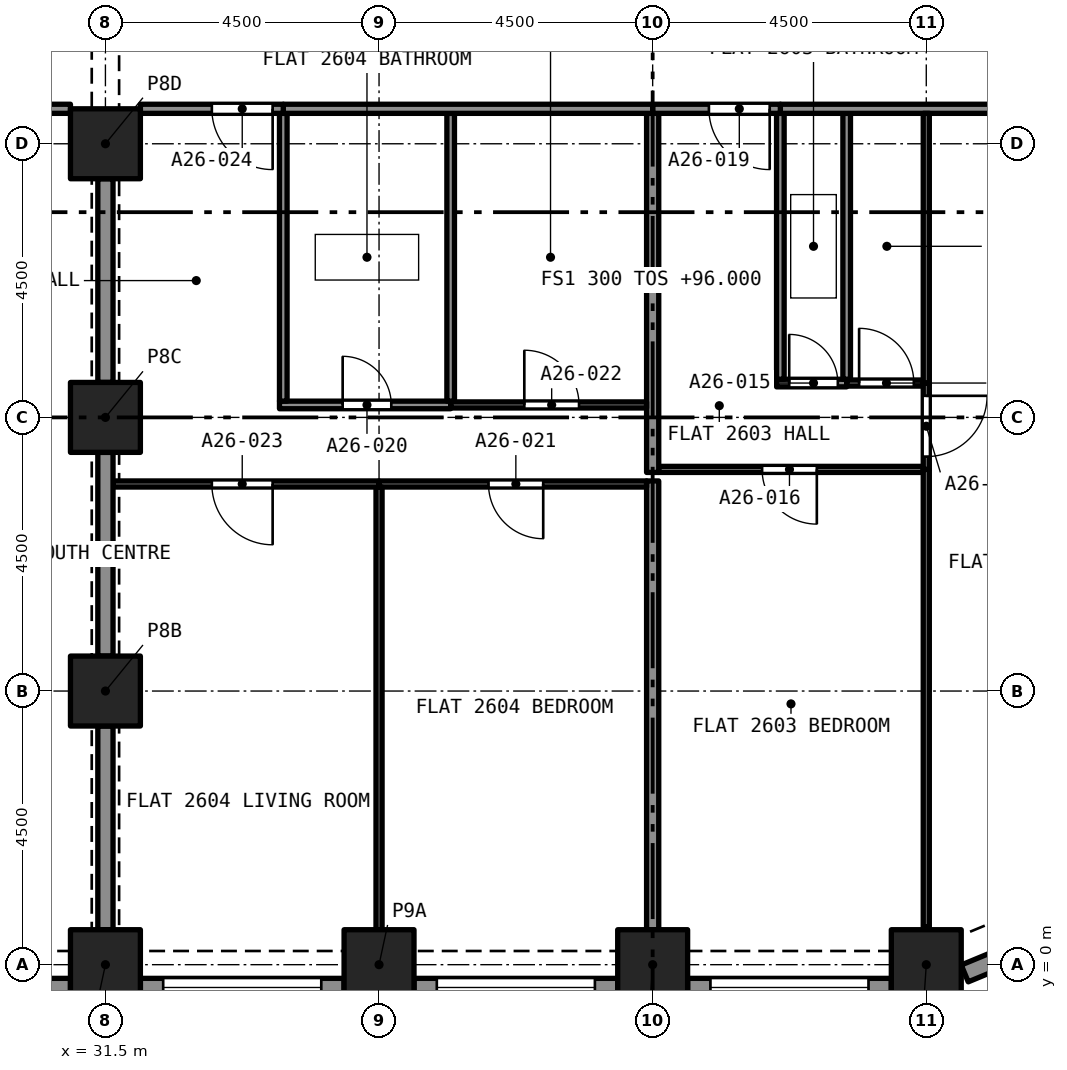
"""IFC4 building model, lengths in metres.
Left out: names, types, materials, properties, quantities, classifications, styles, units other than length and angle.
Written with IfcOpenShell. Run it as: python <this file> out.ifc"""

import sys

from ifc_helpers import new_model, si_unit, direction, frame, frame_2d, origin, origin_2d, place, context, subcontext, project, spatial, rectangle, extrude, element, fill, save


model = new_model("IFC4")
c1 = context("Model", 3, precision=1e-05, world=origin(), true_north=direction((0.0, 1.0)))
c2 = subcontext(c1, "Body", "Model", "MODEL_VIEW")
j1 = project(units=[si_unit("LENGTHUNIT", "METRE"), si_unit("PLANEANGLEUNIT", "RADIAN")], contexts=[c1])
p1 = place(None, origin())
s1 = spatial("IfcSite", under=j1, at=p1, CompositionType="ELEMENT")
p2 = place(p1, origin())
s2 = spatial("IfcBuilding", under=s1, at=p2, CompositionType="ELEMENT")
p3 = place(p2, frame((0.0, 0.0, 96.0)))
s3 = spatial("IfcBuildingStorey", under=s2, at=p3, CompositionType="ELEMENT", Elevation=96.0)
for number, where, z_axis, x_axis in (
    (1, (31.5, 0.0, 0.0), (0.0, 0.0, 1.0), (1.0, 0.0, 0.0)),
    (2, (36.0, 0.0, 0.0), (0.0, 0.0, 1.0), (1.0, 0.0, 0.0)),
    (3, (40.5, 0.0, 0.0), (0.0, 0.0, 1.0), (1.0, 0.0, 0.0)),
    (4, (45.0, 0.0, 0.0), (0.0, 0.0, 1.0), (1.0, 0.0, 0.0)),
    (5, (31.5, 4.5, 0.0), (0.0, 0.0, 1.0), (1.0, 0.0, 0.0)),
    (6, (31.5, 9.0, 0.0), (0.0, 0.0, 1.0), (1.0, 0.0, 0.0)),
    (7, (31.5, 13.5, 0.0), (0.0, 0.0, 1.0), (1.0, 0.0, 0.0)),
):
    element("IfcColumn", number, at=place(p3, frame(where, z_axis=z_axis, x_axis=x_axis)), inside=s3, PredefinedType="COLUMN", context=c2, shape_type="SweptSolid", body=[
        extrude(rectangle(XDim=1.15, YDim=1.15, at=origin_2d()), origin(), (0.0, 0.0, 1.0), 3.2),
    ])
p4 = place(p3, frame((30.925, -0.375, 0.0), z_axis=(0.0, 0.0, 1.0), x_axis=(-1.0, 0.0, 0.0)))
e8 = element("IfcWall", 8, at=p4, inside=s3, PredefinedType="SOLIDWALL", context=c2, shape_type="SweptSolid", body=[
    extrude(rectangle(XDim=3.35, YDim=0.3, at=frame_2d((1.675, 0.0))), origin(), (0.0, 0.0, 1.0), 3.2),
])
p5 = place(p4, frame((0.375, 0.0, 0.45)))
e9 = element("IfcOpeningElement", 9, at=p5, cuts=e8, PredefinedType="OPENING", context=c2, shape_type="SweptSolid", body=[
    extrude(rectangle(XDim=2.6, YDim=1.95, at=frame_2d((1.3, 0.975))), frame((0.0, 0.16, 0.0), z_axis=(0.0, -1.0, 0.0), x_axis=(1.0, 0.0, 0.0)), (0.0, 0.0, 1.0), 0.32),
])
p6 = place(p3, frame((35.425, -0.375, 0.0), z_axis=(0.0, 0.0, 1.0), x_axis=(-1.0, 0.0, 0.0)))
e10 = element("IfcWall", 10, at=p6, inside=s3, PredefinedType="SOLIDWALL", context=c2, shape_type="SweptSolid", body=[
    extrude(rectangle(XDim=3.35, YDim=0.3, at=frame_2d((1.675, 0.0))), origin(), (0.0, 0.0, 1.0), 3.2),
])
p7 = place(p6, frame((0.375, 0.0, 0.45)))
e11 = element("IfcOpeningElement", 11, at=p7, cuts=e10, PredefinedType="OPENING", context=c2, shape_type="SweptSolid", body=[
    extrude(rectangle(XDim=2.6, YDim=1.95, at=frame_2d((1.3, 0.975))), frame((0.0, 0.16, 0.0), z_axis=(0.0, -1.0, 0.0), x_axis=(1.0, 0.0, 0.0)), (0.0, 0.0, 1.0), 0.32),
])
p8 = place(p3, frame((39.925, -0.375, 0.0), z_axis=(0.0, 0.0, 1.0), x_axis=(-1.0, 0.0, 0.0)))
e12 = element("IfcWall", 12, at=p8, inside=s3, PredefinedType="SOLIDWALL", context=c2, shape_type="SweptSolid", body=[
    extrude(rectangle(XDim=3.35, YDim=0.3, at=frame_2d((1.675, 0.0))), origin(), (0.0, 0.0, 1.0), 3.2),
])
p9 = place(p8, frame((0.375, 0.0, 0.45)))
e13 = element("IfcOpeningElement", 13, at=p9, cuts=e12, PredefinedType="OPENING", context=c2, shape_type="SweptSolid", body=[
    extrude(rectangle(XDim=2.6, YDim=1.95, at=frame_2d((1.3, 0.975))), frame((0.0, 0.16, 0.0), z_axis=(0.0, -1.0, 0.0), x_axis=(1.0, 0.0, 0.0)), (0.0, 0.0, 1.0), 0.32),
])
p10 = place(p3, frame((44.425, -0.375, 0.0), z_axis=(0.0, 0.0, 1.0), x_axis=(-1.0, 0.0, 0.0)))
e14 = element("IfcWall", 14, at=p10, inside=s3, PredefinedType="SOLIDWALL", context=c2, shape_type="SweptSolid", body=[
    extrude(rectangle(XDim=3.35, YDim=0.3, at=frame_2d((1.675, 0.0))), origin(), (0.0, 0.0, 1.0), 3.2),
])
p11 = place(p10, frame((0.375, 0.0, 0.45)))
e15 = element("IfcOpeningElement", 15, at=p11, cuts=e14, PredefinedType="OPENING", context=c2, shape_type="SweptSolid", body=[
    extrude(rectangle(XDim=2.6, YDim=1.95, at=frame_2d((1.3, 0.975))), frame((0.0, 0.16, 0.0), z_axis=(0.0, -1.0, 0.0), x_axis=(1.0, 0.0, 0.0)), (0.0, 0.0, 1.0), 0.32),
])
p12 = place(p3, frame((47.631, 0.684, 0.0), z_axis=(0.0, 0.0, 1.0), x_axis=(-0.923862802911, -0.382723818695, 0.0)))
e16 = element("IfcWall", 16, at=p12, inside=s3, PredefinedType="SOLIDWALL", context=c2, shape_type="SweptSolid", body=[
    extrude(rectangle(XDim=2.164, YDim=0.3, at=frame_2d((1.082, 0.0))), origin(), (0.0, 0.0, 1.0), 3.2),
])
p13 = place(p12, frame((0.271, 0.0, 0.45)))
e17 = element("IfcOpeningElement", 17, at=p13, cuts=e16, PredefinedType="OPENING", context=c2, shape_type="SweptSolid", body=[
    extrude(rectangle(XDim=1.4, YDim=1.95, at=frame_2d((0.7, 0.975))), frame((0.0, 0.16, 0.0), z_axis=(0.0, -1.0, 0.0), x_axis=(1.0, 0.0, 0.0)), (0.0, 0.0, 1.0), 0.32),
])
p14 = place(p3, frame((42.538, 9.565, 0.0), z_axis=(0.0, 0.0, 1.0), x_axis=(1.0, 0.0, 0.0)))
e18 = element("IfcWall", 18, at=p14, inside=s3, PredefinedType="PARTITIONING", context=c2, shape_type="SweptSolid", body=[
    extrude(rectangle(XDim=1.153, YDim=0.125, at=frame_2d((0.577, 0.0))), origin(), (0.0, 0.0, 1.0), 2.9),
])
p15 = place(p14, frame((0.208, 0.0, 0.0)))
e19 = element("IfcOpeningElement", 19, at=p15, cuts=e18, PredefinedType="OPENING", context=c2, shape_type="SweptSolid", body=[
    extrude(rectangle(XDim=0.8, YDim=2.1, at=frame_2d((0.4, 1.05))), frame((0.0, 0.073, 0.0), z_axis=(0.0, -1.0, 0.0), x_axis=(1.0, 0.0, 0.0)), (0.0, 0.0, 1.0), 0.145),
])
for number, where, z_axis, x_axis in (
    (20, (42.6, 9.627, 0.0), (0.0, 0.0, 1.0), (0.0, 1.0, 0.0)),
    (21, (43.691, 9.627, 0.0), (0.0, 0.0, 1.0), (0.0, 1.0, 0.0)),
):
    element("IfcWall", number, at=place(p3, frame(where, z_axis=z_axis, x_axis=x_axis)), inside=s3, PredefinedType="PARTITIONING", context=c2, shape_type="SweptSolid", body=[
        extrude(rectangle(XDim=4.373, YDim=0.125, at=frame_2d((2.186, 0.0))), origin(), (0.0, 0.0, 1.0), 2.9),
    ])
p16 = place(p3, frame((42.6, 14.075, 0.0), z_axis=(0.0, 0.0, 1.0), x_axis=(1.0, 0.0, 0.0)))
e22 = element("IfcWall", 22, at=p16, inside=s3, PredefinedType="PARTITIONING", context=c2, shape_type="SweptSolid", body=[
    extrude(rectangle(XDim=6.325, YDim=0.15, at=frame_2d((3.163, 0.0))), origin(), (0.0, 0.0, 1.0), 2.9),
])
p17 = place(p3, frame((44.95, 8.145, 0.0), z_axis=(0.0, 0.0, 1.0), x_axis=(-1.0, 0.0, 0.0)))
e23 = element("IfcWall", 23, at=p17, inside=s3, PredefinedType="PARTITIONING", context=c2, shape_type="SweptSolid", body=[
    extrude(rectangle(XDim=4.35, YDim=0.1, at=frame_2d((2.175, 0.0))), origin(), (0.0, 0.0, 1.0), 2.9),
])
p18 = place(p17, frame((1.75, 0.0, 0.0)))
e24 = element("IfcOpeningElement", 24, at=p18, cuts=e23, PredefinedType="OPENING", context=c2, shape_type="SweptSolid", body=[
    extrude(rectangle(XDim=0.9, YDim=2.1, at=frame_2d((0.45, 1.05))), frame((0.0, 0.06, 0.0), z_axis=(0.0, -1.0, 0.0), x_axis=(1.0, 0.0, 0.0)), (0.0, 0.0, 1.0), 0.12),
])
p19 = place(p3, frame((45.0, 0.622, 0.0), z_axis=(0.0, 0.0, 1.0), x_axis=(0.0, 1.0, 0.0)))
e25 = element("IfcWall", 25, at=p19, inside=s3, PredefinedType="PARTITIONING", context=c2, shape_type="SweptSolid", body=[
    extrude(rectangle(XDim=7.523, YDim=0.1, at=frame_2d((3.761, 0.0))), origin(), (0.0, 0.0, 1.0), 2.9),
])
p20 = place(p3, frame((40.5, 0.575, 0.0), z_axis=(0.0, 0.0, 1.0), x_axis=(0.0, 1.0, 0.0)))
e26 = element("IfcWall", 26, at=p20, inside=s3, PredefinedType="PARTITIONING", context=c2, shape_type="SweptSolid", body=[
    extrude(rectangle(XDim=7.38, YDim=0.2, at=frame_2d((3.69, 0.0))), origin(), (0.0, 0.0, 1.0), 2.9),
])
p21 = place(p3, frame((43.691, 9.565, 0.0), z_axis=(0.0, 0.0, 1.0), x_axis=(1.0, 0.0, 0.0)))
e27 = element("IfcWall", 27, at=p21, inside=s3, PredefinedType="PARTITIONING", context=c2, shape_type="SweptSolid", body=[
    extrude(rectangle(XDim=1.259, YDim=0.1, at=frame_2d((0.629, 0.0))), origin(), (0.0, 0.0, 1.0), 2.9),
])
p22 = place(p21, frame((0.205, 0.0, 0.0)))
e28 = element("IfcOpeningElement", 28, at=p22, cuts=e27, PredefinedType="OPENING", context=c2, shape_type="SweptSolid", body=[
    extrude(rectangle(XDim=0.9, YDim=2.1, at=frame_2d((0.45, 1.05))), frame((0.0, 0.06, 0.0), z_axis=(0.0, -1.0, 0.0), x_axis=(1.0, 0.0, 0.0)), (0.0, 0.0, 1.0), 0.12),
])
p23 = place(p3, frame((45.0, 9.565, 0.0), z_axis=(0.0, 0.0, 1.0), x_axis=(0.0, -1.0, 0.0)))
e29 = element("IfcWall", 29, at=p23, inside=s3, PredefinedType="PARTITIONING", context=c2, shape_type="SweptSolid", body=[
    extrude(rectangle(XDim=1.42, YDim=0.1, at=frame_2d((0.71, 0.0))), origin(), (0.0, 0.0, 1.0), 2.9),
])
p24 = place(p23, frame((0.21, 0.0, 0.0)))
e30 = element("IfcOpeningElement", 30, at=p24, cuts=e29, PredefinedType="OPENING", context=c2, shape_type="SweptSolid", body=[
    extrude(rectangle(XDim=1.0, YDim=2.1, at=frame_2d((0.5, 1.05))), frame((0.0, 0.06, 0.0), z_axis=(0.0, -1.0, 0.0), x_axis=(1.0, 0.0, 0.0)), (0.0, 0.0, 1.0), 0.12),
])
p25 = place(p3, frame((40.5, 8.095, 0.0), z_axis=(0.0, 0.0, 1.0), x_axis=(0.0, 1.0, 0.0)))
e31 = element("IfcWall", 31, at=p25, inside=s3, PredefinedType="PARTITIONING", context=c2, shape_type="SweptSolid", body=[
    extrude(rectangle(XDim=5.905, YDim=0.2, at=frame_2d((2.953, 0.0))), origin(), (0.0, 0.0, 1.0), 2.9),
])
p26 = place(p3, frame((42.6, 14.075, 0.0), z_axis=(0.0, 0.0, 1.0), x_axis=(-1.0, 0.0, 0.0)))
e32 = element("IfcWall", 32, at=p26, inside=s3, PredefinedType="PARTITIONING", context=c2, shape_type="SweptSolid", body=[
    extrude(rectangle(XDim=2.1, YDim=0.15, at=frame_2d((1.05, 0.0))), origin(), (0.0, 0.0, 1.0), 2.9),
])
p27 = place(p26, frame((0.175, 0.0, 0.0)))
e33 = element("IfcOpeningElement", 33, at=p27, cuts=e32, PredefinedType="OPENING", context=c2, shape_type="SweptSolid", body=[
    extrude(rectangle(XDim=1.0, YDim=2.1, at=frame_2d((0.5, 1.05))), frame((0.0, 0.085, 0.0), z_axis=(0.0, -1.0, 0.0), x_axis=(1.0, 0.0, 0.0)), (0.0, 0.0, 1.0), 0.17),
])
p28 = place(p3, frame((45.0, 9.565, 0.0), z_axis=(0.0, 0.0, 1.0), x_axis=(0.0, 1.0, 0.0)))
e34 = element("IfcWall", 34, at=p28, inside=s3, PredefinedType="PARTITIONING", context=c2, shape_type="SweptSolid", body=[
    extrude(rectangle(XDim=4.435, YDim=0.1, at=frame_2d((2.218, 0.0))), origin(), (0.0, 0.0, 1.0), 2.9),
])
p29 = place(p3, frame((34.363, 9.205, 0.0), z_axis=(0.0, 0.0, 1.0), x_axis=(1.0, 0.0, 0.0)))
e35 = element("IfcWall", 35, at=p29, inside=s3, PredefinedType="PARTITIONING", context=c2, shape_type="SweptSolid", body=[
    extrude(rectangle(XDim=2.816, YDim=0.125, at=frame_2d((1.408, 0.0))), origin(), (0.0, 0.0, 1.0), 2.9),
])
p30 = place(p29, frame((1.039, 0.0, 0.0)))
e36 = element("IfcOpeningElement", 36, at=p30, cuts=e35, PredefinedType="OPENING", context=c2, shape_type="SweptSolid", body=[
    extrude(rectangle(XDim=0.8, YDim=2.1, at=frame_2d((0.4, 1.05))), frame((0.0, 0.073, 0.0), z_axis=(0.0, -1.0, 0.0), x_axis=(1.0, 0.0, 0.0)), (0.0, 0.0, 1.0), 0.145),
])
for number, where, z_axis, x_axis in (
    (37, (34.425, 9.268, 0.0), (0.0, 0.0, 1.0), (0.0, 1.0, 0.0)),
    (38, (37.178, 9.268, 0.0), (0.0, 0.0, 1.0), (0.0, 1.0, 0.0)),
):
    element("IfcWall", number, at=place(p3, frame(where, z_axis=z_axis, x_axis=x_axis)), inside=s3, PredefinedType="PARTITIONING", context=c2, shape_type="SweptSolid", body=[
        extrude(rectangle(XDim=4.732, YDim=0.125, at=frame_2d((2.366, 0.0))), origin(), (0.0, 0.0, 1.0), 2.9),
    ])
p31 = place(p3, frame((34.425, 14.075, 0.0), z_axis=(0.0, 0.0, 1.0), x_axis=(1.0, 0.0, 0.0)))
e39 = element("IfcWall", 39, at=p31, inside=s3, PredefinedType="PARTITIONING", context=c2, shape_type="SweptSolid", body=[
    extrude(rectangle(XDim=6.075, YDim=0.15, at=frame_2d((3.038, 0.0))), origin(), (0.0, 0.0, 1.0), 2.9),
])
p32 = place(p3, frame((40.4, 7.905, 0.0), z_axis=(0.0, 0.0, 1.0), x_axis=(-1.0, 0.0, 0.0)))
e40 = element("IfcWall", 40, at=p32, inside=s3, PredefinedType="PARTITIONING", context=c2, shape_type="SweptSolid", body=[
    extrude(rectangle(XDim=4.4, YDim=0.1, at=frame_2d((2.2, 0.0))), origin(), (0.0, 0.0, 1.0), 2.9),
])
p33 = place(p32, frame((1.7, 0.0, 0.0)))
e41 = element("IfcOpeningElement", 41, at=p33, cuts=e40, PredefinedType="OPENING", context=c2, shape_type="SweptSolid", body=[
    extrude(rectangle(XDim=0.9, YDim=2.1, at=frame_2d((0.45, 1.05))), frame((0.0, 0.06, 0.0), z_axis=(0.0, -1.0, 0.0), x_axis=(1.0, 0.0, 0.0)), (0.0, 0.0, 1.0), 0.12),
])
p34 = place(p3, frame((36.0, 0.575, 0.0), z_axis=(0.0, 0.0, 1.0), x_axis=(0.0, 1.0, 0.0)))
e42 = element("IfcWall", 42, at=p34, inside=s3, PredefinedType="PARTITIONING", context=c2, shape_type="SweptSolid", body=[
    extrude(rectangle(XDim=7.28, YDim=0.1, at=frame_2d((3.64, 0.0))), origin(), (0.0, 0.0, 1.0), 2.9),
])
p35 = place(p3, frame((37.178, 9.205, 0.0), z_axis=(0.0, 0.0, 1.0), x_axis=(1.0, 0.0, 0.0)))
e43 = element("IfcWall", 43, at=p35, inside=s3, PredefinedType="PARTITIONING", context=c2, shape_type="SweptSolid", body=[
    extrude(rectangle(XDim=3.222, YDim=0.1, at=frame_2d((1.611, 0.0))), origin(), (0.0, 0.0, 1.0), 2.9),
])
p36 = place(p35, frame((1.211, 0.0, 0.0)))
e44 = element("IfcOpeningElement", 44, at=p36, cuts=e43, PredefinedType="OPENING", context=c2, shape_type="SweptSolid", body=[
    extrude(rectangle(XDim=0.9, YDim=2.1, at=frame_2d((0.45, 1.05))), frame((0.0, 0.06, 0.0), z_axis=(0.0, -1.0, 0.0), x_axis=(1.0, 0.0, 0.0)), (0.0, 0.0, 1.0), 0.12),
])
p37 = place(p3, frame((36.0, 7.905, 0.0), z_axis=(0.0, 0.0, 1.0), x_axis=(-1.0, 0.0, 0.0)))
e45 = element("IfcWall", 45, at=p37, inside=s3, PredefinedType="PARTITIONING", context=c2, shape_type="SweptSolid", body=[
    extrude(rectangle(XDim=4.375, YDim=0.1, at=frame_2d((2.188, 0.0))), origin(), (0.0, 0.0, 1.0), 2.9),
])
p38 = place(p37, frame((1.75, 0.0, 0.0)))
e46 = element("IfcOpeningElement", 46, at=p38, cuts=e45, PredefinedType="OPENING", context=c2, shape_type="SweptSolid", body=[
    extrude(rectangle(XDim=1.0, YDim=2.1, at=frame_2d((0.5, 1.05))), frame((0.0, 0.06, 0.0), z_axis=(0.0, -1.0, 0.0), x_axis=(1.0, 0.0, 0.0)), (0.0, 0.0, 1.0), 0.12),
])
p39 = place(p3, frame((31.5, 9.575, 0.0), z_axis=(0.0, 0.0, 1.0), x_axis=(0.0, 1.0, 0.0)))
e47 = element("IfcWall", 47, at=p39, inside=s3, PredefinedType="PARTITIONING", context=c2, shape_type="SweptSolid", body=[
    extrude(rectangle(XDim=3.35, YDim=0.25, at=frame_2d((1.675, 0.0))), origin(), (0.0, 0.0, 1.0), 2.38),
])
p40 = place(p3, frame((34.425, 14.075, 0.0), z_axis=(0.0, 0.0, 1.0), x_axis=(-1.0, 0.0, 0.0)))
e48 = element("IfcWall", 48, at=p40, inside=s3, PredefinedType="PARTITIONING", context=c2, shape_type="SweptSolid", body=[
    extrude(rectangle(XDim=2.35, YDim=0.15, at=frame_2d((1.175, 0.0))), origin(), (0.0, 0.0, 1.0), 2.9),
])
p41 = place(p40, frame((0.175, 0.0, 0.0)))
e49 = element("IfcOpeningElement", 49, at=p41, cuts=e48, PredefinedType="OPENING", context=c2, shape_type="SweptSolid", body=[
    extrude(rectangle(XDim=1.0, YDim=2.1, at=frame_2d((0.5, 1.05))), frame((0.0, 0.085, 0.0), z_axis=(0.0, -1.0, 0.0), x_axis=(1.0, 0.0, 0.0)), (0.0, 0.0, 1.0), 0.17),
])
for number, where, z_axis, x_axis in (
    (50, (31.5, 0.575, 0.0), (0.0, 0.0, 1.0), (0.0, 1.0, 0.0)),
    (51, (31.5, 5.075, 0.0), (0.0, 0.0, 1.0), (0.0, 1.0, 0.0)),
):
    element("IfcWall", number, at=place(p3, frame(where, z_axis=z_axis, x_axis=x_axis)), inside=s3, PredefinedType="PARTITIONING", context=c2, shape_type="SweptSolid", body=[
        extrude(rectangle(XDim=3.35, YDim=0.25, at=frame_2d((1.675, 0.0))), origin(), (0.0, 0.0, 1.0), 2.38),
    ])
p42 = place(p3, frame((30.925, 14.075, 0.0), z_axis=(0.0, 0.0, 1.0), x_axis=(-1.0, 0.0, 0.0)))
e52 = element("IfcWall", 52, at=p42, inside=s3, PredefinedType="PARTITIONING", context=c2, shape_type="SweptSolid", body=[
    extrude(rectangle(XDim=3.925, YDim=0.15, at=frame_2d((1.962, 0.0))), origin(), (0.0, 0.0, 1.0), 2.75),
])
p43 = place(p42, frame((1.175, 0.0, 0.0)))
e53 = element("IfcOpeningElement", 53, at=p43, cuts=e52, PredefinedType="OPENING", context=c2, shape_type="SweptSolid", body=[
    extrude(rectangle(XDim=1.0, YDim=2.1, at=frame_2d((0.5, 1.05))), frame((0.0, 0.085, 0.0), z_axis=(0.0, -1.0, 0.0), x_axis=(1.0, 0.0, 0.0)), (0.0, 0.0, 1.0), 0.17),
])
p44 = place(p7, origin())
e54 = element("IfcWindow", 54, at=p44, inside=s3, PartitioningType="SINGLE_PANEL", PredefinedType="WINDOW", context=c2, shape_type="SweptSolid", body=[
    extrude(rectangle(XDim=2.6, YDim=1.95, at=frame_2d((1.3, 0.975))), frame((0.0, 0.03, 0.0), z_axis=(0.0, -1.0, 0.0), x_axis=(1.0, 0.0, 0.0)), (0.0, 0.0, 1.0), 0.06),
])
fill(e11, e54)
p45 = place(p9, origin())
e55 = element("IfcWindow", 55, at=p45, inside=s3, PartitioningType="SINGLE_PANEL", PredefinedType="WINDOW", context=c2, shape_type="SweptSolid", body=[
    extrude(rectangle(XDim=2.6, YDim=1.95, at=frame_2d((1.3, 0.975))), frame((0.0, 0.03, 0.0), z_axis=(0.0, -1.0, 0.0), x_axis=(1.0, 0.0, 0.0)), (0.0, 0.0, 1.0), 0.06),
])
fill(e13, e55)
p46 = place(p11, origin())
e56 = element("IfcWindow", 56, at=p46, inside=s3, PartitioningType="SINGLE_PANEL", PredefinedType="WINDOW", context=c2, shape_type="SweptSolid", body=[
    extrude(rectangle(XDim=2.6, YDim=1.95, at=frame_2d((1.3, 0.975))), frame((0.0, 0.03, 0.0), z_axis=(0.0, -1.0, 0.0), x_axis=(1.0, 0.0, 0.0)), (0.0, 0.0, 1.0), 0.06),
])
fill(e15, e56)
p47 = place(p15, origin())
e57 = element("IfcDoor", 57, at=p47, inside=s3, OperationType="SINGLE_SWING_RIGHT", PredefinedType="DOOR", context=c2, shape_type="SweptSolid", body=[
    extrude(rectangle(XDim=0.8, YDim=2.1, at=frame_2d((0.4, 1.05))), frame((0.0, 0.025, 0.0), z_axis=(0.0, -1.0, 0.0), x_axis=(1.0, 0.0, 0.0)), (0.0, 0.0, 1.0), 0.05),
])
fill(e19, e57)
p48 = place(p18, origin())
e58 = element("IfcDoor", 58, at=p48, inside=s3, OperationType="SINGLE_SWING_RIGHT", PredefinedType="DOOR", context=c2, shape_type="SweptSolid", body=[
    extrude(rectangle(XDim=0.9, YDim=2.1, at=frame_2d((0.45, 1.05))), frame((0.0, 0.025, 0.0), z_axis=(0.0, -1.0, 0.0), x_axis=(1.0, 0.0, 0.0)), (0.0, 0.0, 1.0), 0.05),
])
fill(e24, e58)
p49 = place(p22, origin())
e59 = element("IfcDoor", 59, at=p49, inside=s3, OperationType="SINGLE_SWING_RIGHT", PredefinedType="DOOR", context=c2, shape_type="SweptSolid", body=[
    extrude(rectangle(XDim=0.9, YDim=2.1, at=frame_2d((0.45, 1.05))), frame((0.0, 0.025, 0.0), z_axis=(0.0, -1.0, 0.0), x_axis=(1.0, 0.0, 0.0)), (0.0, 0.0, 1.0), 0.05),
])
fill(e28, e59)
p50 = place(p24, origin())
e60 = element("IfcDoor", 60, at=p50, inside=s3, OperationType="SINGLE_SWING_LEFT", PredefinedType="DOOR", context=c2, shape_type="SweptSolid", body=[
    extrude(rectangle(XDim=1.0, YDim=2.1, at=frame_2d((0.5, 1.05))), frame((0.0, 0.025, 0.0), z_axis=(0.0, -1.0, 0.0), x_axis=(1.0, 0.0, 0.0)), (0.0, 0.0, 1.0), 0.05),
])
fill(e30, e60)
p51 = place(p27, origin())
e61 = element("IfcDoor", 61, at=p51, inside=s3, OperationType="SINGLE_SWING_LEFT", PredefinedType="DOOR", context=c2, shape_type="SweptSolid", body=[
    extrude(rectangle(XDim=1.0, YDim=2.1, at=frame_2d((0.5, 1.05))), frame((0.0, 0.025, 0.0), z_axis=(0.0, -1.0, 0.0), x_axis=(1.0, 0.0, 0.0)), (0.0, 0.0, 1.0), 0.05),
])
fill(e33, e61)
p52 = place(p30, origin())
e62 = element("IfcDoor", 62, at=p52, inside=s3, OperationType="SINGLE_SWING_RIGHT", PredefinedType="DOOR", context=c2, shape_type="SweptSolid", body=[
    extrude(rectangle(XDim=0.8, YDim=2.1, at=frame_2d((0.4, 1.05))), frame((0.0, 0.025, 0.0), z_axis=(0.0, -1.0, 0.0), x_axis=(1.0, 0.0, 0.0)), (0.0, 0.0, 1.0), 0.05),
])
fill(e36, e62)
p53 = place(p33, origin())
e63 = element("IfcDoor", 63, at=p53, inside=s3, OperationType="SINGLE_SWING_LEFT", PredefinedType="DOOR", context=c2, shape_type="SweptSolid", body=[
    extrude(rectangle(XDim=0.9, YDim=2.1, at=frame_2d((0.45, 1.05))), frame((0.0, 0.025, 0.0), z_axis=(0.0, -1.0, 0.0), x_axis=(1.0, 0.0, 0.0)), (0.0, 0.0, 1.0), 0.05),
])
fill(e41, e63)
p54 = place(p36, origin())
e64 = element("IfcDoor", 64, at=p54, inside=s3, OperationType="SINGLE_SWING_RIGHT", PredefinedType="DOOR", context=c2, shape_type="SweptSolid", body=[
    extrude(rectangle(XDim=0.9, YDim=2.1, at=frame_2d((0.45, 1.05))), frame((0.0, 0.025, 0.0), z_axis=(0.0, -1.0, 0.0), x_axis=(1.0, 0.0, 0.0)), (0.0, 0.0, 1.0), 0.05),
])
fill(e44, e64)
p55 = place(p38, origin())
e65 = element("IfcDoor", 65, at=p55, inside=s3, OperationType="SINGLE_SWING_RIGHT", PredefinedType="DOOR", context=c2, shape_type="SweptSolid", body=[
    extrude(rectangle(XDim=1.0, YDim=2.1, at=frame_2d((0.5, 1.05))), frame((0.0, 0.025, 0.0), z_axis=(0.0, -1.0, 0.0), x_axis=(1.0, 0.0, 0.0)), (0.0, 0.0, 1.0), 0.05),
])
fill(e46, e65)
p56 = place(p41, origin())
e66 = element("IfcDoor", 66, at=p56, inside=s3, OperationType="SINGLE_SWING_LEFT", PredefinedType="DOOR", context=c2, shape_type="SweptSolid", body=[
    extrude(rectangle(XDim=1.0, YDim=2.1, at=frame_2d((0.5, 1.05))), frame((0.0, 0.025, 0.0), z_axis=(0.0, -1.0, 0.0), x_axis=(1.0, 0.0, 0.0)), (0.0, 0.0, 1.0), 0.05),
])
fill(e49, e66)
save(model, sys.argv[1])
